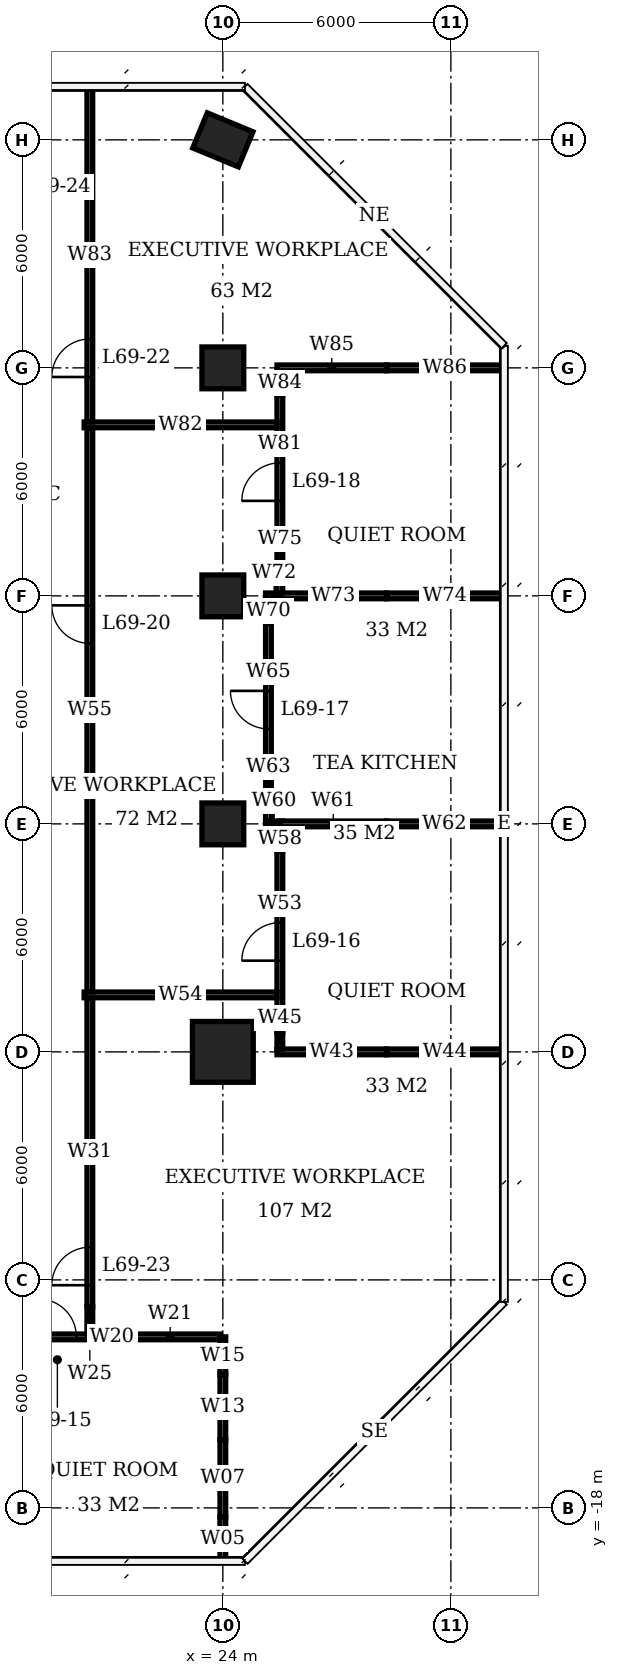
"""IFC4 building model, lengths in metres.
Left out: names, types, materials, properties, quantities, classifications, styles, units other than length and angle.
Written with IfcOpenShell. Run it as: python <this file> out.ifc"""

import sys

from ifc_helpers import new_model, si_unit, direction, frame, frame_2d, origin, origin_2d, place, context, subcontext, project, spatial, rectangle, extrude, element, fill, save


model = new_model("IFC4")
c1 = context("Model", 3, precision=1e-05, world=origin(), true_north=direction((0.0, 1.0)))
c2 = subcontext(c1, "Body", "Model", "MODEL_VIEW")
j1 = project(units=[si_unit("LENGTHUNIT", "METRE"), si_unit("PLANEANGLEUNIT", "RADIAN")], contexts=[c1])
p1 = place(None, origin())
s1 = spatial("IfcSite", under=j1, at=p1, CompositionType="ELEMENT")
p2 = place(p1, origin())
s2 = spatial("IfcBuilding", under=s1, at=p2, CompositionType="ELEMENT")
p3 = place(p2, frame((0.0, 0.0, 280.1)))
s3 = spatial("IfcBuildingStorey", under=s2, at=p3, CompositionType="ELEMENT", Elevation=280.1)
p4 = place(p3, frame((24.0, -6.0, 0.0), z_axis=(0.0, 0.0, 1.0), x_axis=(1.0, 0.0, 0.0)))
e1 = element("IfcColumn", 1, at=p4, inside=s3, PredefinedType="COLUMN", context=c2, shape_type="SweptSolid", body=[
    extrude(rectangle(XDim=1.6, YDim=1.6, at=origin_2d()), origin(), (0.0, 0.0, 1.0), 3.9),
])
for number, where, z_axis, x_axis in (
    (2, (24.0, 0.0, 0.0), (0.0, 0.0, 1.0), (1.0, 0.0, 0.0)),
    (3, (24.0, 6.0, 0.0), (0.0, 0.0, 1.0), (1.0, 0.0, 0.0)),
    (4, (24.0, 12.0, 0.0), (0.0, 0.0, 1.0), (1.0, 0.0, 0.0)),
):
    element("IfcColumn", number, at=place(p3, frame(where, z_axis=z_axis, x_axis=x_axis)), inside=s3, PredefinedType="COLUMN", context=c2, shape_type="SweptSolid", body=[
        extrude(rectangle(XDim=1.1, YDim=1.1, at=origin_2d()), origin(), (0.0, 0.0, 1.0), 3.9),
    ])
p5 = place(p3, frame((24.0, 18.0, 0.0), z_axis=(0.0, 0.0, 1.0), x_axis=(0.923879532511, -0.382683432365, 0.0)))
e5 = element("IfcColumn", 5, at=p5, inside=s3, PredefinedType="COLUMN", context=c2, shape_type="SweptSolid", body=[
    extrude(rectangle(XDim=1.3, YDim=1.0, at=origin_2d()), origin(), (0.0, 0.0, 1.0), 3.9),
])
p6 = place(p3, frame((18.075, -13.5, 0.0), z_axis=(0.0, 0.0, 1.0), x_axis=(1.0, 0.0, 0.0)))
e6 = element("IfcWall", 6, at=p6, inside=s3, PredefinedType="PARTITIONING", context=c2, shape_type="SweptSolid", body=[
    extrude(rectangle(XDim=3.217, YDim=0.15, at=frame_2d((1.608, 0.0))), origin(), (0.0, 0.0, 1.0), 2.65),
])
p7 = place(p6, frame((1.071, 0.0, 0.0)))
e7 = element("IfcOpeningElement", 7, at=p7, cuts=e6, PredefinedType="OPENING", context=c2, shape_type="SweptSolid", body=[
    extrude(rectangle(XDim=1.0, YDim=2.4, at=frame_2d((0.5, 1.2))), frame((0.0, 0.085, 0.0), z_axis=(0.0, -1.0, 0.0), x_axis=(1.0, 0.0, 0.0)), (0.0, 0.0, 1.0), 0.17),
])
p8 = place(p3, frame((21.292, -13.5, 0.0), z_axis=(0.0, 0.0, 1.0), x_axis=(1.0, 0.0, 0.0)))
e8 = element("IfcWall", 8, at=p8, inside=s3, PredefinedType="PARTITIONING", context=c2, shape_type="SweptSolid", body=[
    extrude(rectangle(XDim=2.643, YDim=0.15, at=frame_2d((1.322, 0.0))), origin(), (0.0, 0.0, 1.0), 3.65),
])
p9 = place(p3, frame((25.425, -6.0, 0.0), z_axis=(0.0, 0.0, 1.0), x_axis=(1.0, 0.0, 0.0)))
e9 = element("IfcWall", 9, at=p9, inside=s3, PredefinedType="PARTITIONING", context=c2, shape_type="SweptSolid", body=[
    extrude(rectangle(XDim=2.885, YDim=0.15, at=frame_2d((1.442, 0.0))), origin(), (0.0, 0.0, 1.0), 2.65),
])
p10 = place(p3, frame((28.31, -6.0, 0.0), z_axis=(0.0, 0.0, 1.0), x_axis=(1.0, 0.0, 0.0)))
e10 = element("IfcWall", 10, at=p10, inside=s3, PredefinedType="PARTITIONING", context=c2, shape_type="SweptSolid", body=[
    extrude(rectangle(XDim=3.065, YDim=0.15, at=frame_2d((1.532, 0.0))), origin(), (0.0, 0.0, 1.0), 3.65),
])
p11 = place(p3, frame((25.125, 0.0, 0.0), z_axis=(0.0, 0.0, 1.0), x_axis=(1.0, 0.0, 0.0)))
e11 = element("IfcWall", 11, at=p11, inside=s3, PredefinedType="PARTITIONING", context=c2, shape_type="SweptSolid", body=[
    extrude(rectangle(XDim=0.45, YDim=0.15, at=frame_2d((0.225, 0.0))), origin(), (0.0, 0.0, 1.0), 2.65),
])
p12 = place(p3, frame((25.5, 0.0, 0.0), z_axis=(0.0, 0.0, 1.0), x_axis=(1.0, 0.0, 0.0)))
e12 = element("IfcWall", 12, at=p12, inside=s3, PredefinedType="PARTITIONING", context=c2, shape_type="SweptSolid", body=[
    extrude(rectangle(XDim=2.81, YDim=0.15, at=frame_2d((1.405, 0.0))), origin(), (0.0, 0.0, 1.0), 2.65),
])
p13 = place(p3, frame((28.31, 0.0, 0.0), z_axis=(0.0, 0.0, 1.0), x_axis=(1.0, 0.0, 0.0)))
e13 = element("IfcWall", 13, at=p13, inside=s3, PredefinedType="PARTITIONING", context=c2, shape_type="SweptSolid", body=[
    extrude(rectangle(XDim=3.04, YDim=0.15, at=frame_2d((1.52, 0.0))), origin(), (0.0, 0.0, 1.0), 3.65),
])
p14 = place(p3, frame((25.125, 6.0, 0.0), z_axis=(0.0, 0.0, 1.0), x_axis=(1.0, 0.0, 0.0)))
e14 = element("IfcWall", 14, at=p14, inside=s3, PredefinedType="PARTITIONING", context=c2, shape_type="SweptSolid", body=[
    extrude(rectangle(XDim=0.45, YDim=0.15, at=frame_2d((0.225, 0.0))), origin(), (0.0, 0.0, 1.0), 2.65),
])
p15 = place(p3, frame((25.5, 6.0, 0.0), z_axis=(0.0, 0.0, 1.0), x_axis=(1.0, 0.0, 0.0)))
e15 = element("IfcWall", 15, at=p15, inside=s3, PredefinedType="PARTITIONING", context=c2, shape_type="SweptSolid", body=[
    extrude(rectangle(XDim=2.81, YDim=0.15, at=frame_2d((1.405, 0.0))), origin(), (0.0, 0.0, 1.0), 2.65),
])
p16 = place(p3, frame((28.31, 6.0, 0.0), z_axis=(0.0, 0.0, 1.0), x_axis=(1.0, 0.0, 0.0)))
e16 = element("IfcWall", 16, at=p16, inside=s3, PredefinedType="PARTITIONING", context=c2, shape_type="SweptSolid", body=[
    extrude(rectangle(XDim=3.065, YDim=0.15, at=frame_2d((1.532, 0.0))), origin(), (0.0, 0.0, 1.0), 3.65),
])
p17 = place(p3, frame((25.425, 12.0, 0.0), z_axis=(0.0, 0.0, 1.0), x_axis=(1.0, 0.0, 0.0)))
e17 = element("IfcWall", 17, at=p17, inside=s3, PredefinedType="PARTITIONING", context=c2, shape_type="SweptSolid", body=[
    extrude(rectangle(XDim=2.885, YDim=0.15, at=frame_2d((1.442, 0.0))), origin(), (0.0, 0.0, 1.0), 2.65),
])
p18 = place(p3, frame((28.31, 12.0, 0.0), z_axis=(0.0, 0.0, 1.0), x_axis=(1.0, 0.0, 0.0)))
e18 = element("IfcWall", 18, at=p18, inside=s3, PredefinedType="PARTITIONING", context=c2, shape_type="SweptSolid", body=[
    extrude(rectangle(XDim=3.065, YDim=0.15, at=frame_2d((1.532, 0.0))), origin(), (0.0, 0.0, 1.0), 3.65),
])
p19 = place(p3, frame((24.0, -19.375, 0.0), z_axis=(0.0, 0.0, 1.0), x_axis=(0.0, 1.0, 0.0)))
e19 = element("IfcWall", 19, at=p19, inside=s3, PredefinedType="PARTITIONING", context=c2, shape_type="SweptSolid", body=[
    extrude(rectangle(XDim=1.138, YDim=0.15, at=frame_2d((0.569, 0.0))), origin(), (0.0, 0.0, 1.0), 3.65),
])
p20 = place(p3, frame((24.0, -18.237, 0.0), z_axis=(0.0, 0.0, 1.0), x_axis=(0.0, 1.0, 0.0)))
e20 = element("IfcWall", 20, at=p20, inside=s3, PredefinedType="PARTITIONING", context=c2, shape_type="SweptSolid", body=[
    extrude(rectangle(XDim=2.029, YDim=0.15, at=frame_2d((1.015, 0.0))), origin(), (0.0, 0.0, 1.0), 2.65),
])
p21 = place(p3, frame((24.0, -16.208, 0.0), z_axis=(0.0, 0.0, 1.0), x_axis=(0.0, 1.0, 0.0)))
e21 = element("IfcWall", 21, at=p21, inside=s3, PredefinedType="PARTITIONING", context=c2, shape_type="SweptSolid", body=[
    extrude(rectangle(XDim=1.718, YDim=0.15, at=frame_2d((0.859, 0.0))), origin(), (0.0, 0.0, 1.0), 3.65),
])
p22 = place(p3, frame((24.0, -14.49, 0.0), z_axis=(0.0, 0.0, 1.0), x_axis=(0.0, 1.0, 0.0)))
e22 = element("IfcWall", 22, at=p22, inside=s3, PredefinedType="PARTITIONING", context=c2, shape_type="SweptSolid", body=[
    extrude(rectangle(XDim=0.99, YDim=0.15, at=frame_2d((0.495, 0.0))), origin(), (0.0, 0.0, 1.0), 2.65),
])
p23 = place(p3, frame((25.2, 0.075, 0.0), z_axis=(0.0, 0.0, 1.0), x_axis=(0.0, 1.0, 0.0)))
e23 = element("IfcWall", 23, at=p23, inside=s3, PredefinedType="PARTITIONING", context=c2, shape_type="SweptSolid", body=[
    extrude(rectangle(XDim=0.635, YDim=0.15, at=frame_2d((0.317, 0.0))), origin(), (0.0, 0.0, 1.0), 2.65),
])
p24 = place(p3, frame((25.2, 0.71, 0.0), z_axis=(0.0, 0.0, 1.0), x_axis=(0.0, 1.0, 0.0)))
e24 = element("IfcWall", 24, at=p24, inside=s3, PredefinedType="PARTITIONING", context=c2, shape_type="SweptSolid", body=[
    extrude(rectangle(XDim=4.58, YDim=0.15, at=frame_2d((2.29, 0.0))), origin(), (0.0, 0.0, 1.0), 3.65),
])
p25 = place(p24, frame((1.79, 0.0, 0.0)))
e25 = element("IfcOpeningElement", 25, at=p25, cuts=e24, PredefinedType="OPENING", context=c2, shape_type="SweptSolid", body=[
    extrude(rectangle(XDim=1.0, YDim=2.4, at=frame_2d((0.5, 1.2))), frame((0.0, 0.085, 0.0), z_axis=(0.0, -1.0, 0.0), x_axis=(1.0, 0.0, 0.0)), (0.0, 0.0, 1.0), 0.17),
])
p26 = place(p3, frame((25.2, 5.29, 0.0), z_axis=(0.0, 0.0, 1.0), x_axis=(0.0, 1.0, 0.0)))
e26 = element("IfcWall", 26, at=p26, inside=s3, PredefinedType="PARTITIONING", context=c2, shape_type="SweptSolid", body=[
    extrude(rectangle(XDim=0.635, YDim=0.15, at=frame_2d((0.317, 0.0))), origin(), (0.0, 0.0, 1.0), 2.65),
])
p27 = place(p3, frame((25.5, -5.925, 0.0), z_axis=(0.0, 0.0, 1.0), x_axis=(0.0, 1.0, 0.0)))
e27 = element("IfcWall", 27, at=p27, inside=s3, PredefinedType="PARTITIONING", context=c2, shape_type="SweptSolid", body=[
    extrude(rectangle(XDim=0.435, YDim=0.15, at=frame_2d((0.218, 0.0))), origin(), (0.0, 0.0, 1.0), 2.65),
])
p28 = place(p3, frame((25.5, -5.49, 0.0), z_axis=(0.0, 0.0, 1.0), x_axis=(0.0, 1.0, 0.0)))
e28 = element("IfcWall", 28, at=p28, inside=s3, PredefinedType="PARTITIONING", context=c2, shape_type="SweptSolid", body=[
    extrude(rectangle(XDim=4.78, YDim=0.15, at=frame_2d((2.39, 0.0))), origin(), (0.0, 0.0, 1.0), 3.65),
])
p29 = place(p28, frame((1.89, 0.0, 0.0)))
e29 = element("IfcOpeningElement", 29, at=p29, cuts=e28, PredefinedType="OPENING", context=c2, shape_type="SweptSolid", body=[
    extrude(rectangle(XDim=1.0, YDim=2.4, at=frame_2d((0.5, 1.2))), frame((0.0, 0.085, 0.0), z_axis=(0.0, -1.0, 0.0), x_axis=(1.0, 0.0, 0.0)), (0.0, 0.0, 1.0), 0.17),
])
for number, where, z_axis, x_axis in (
    (30, (25.5, -0.71, 0.0), (0.0, 0.0, 1.0), (0.0, 1.0, 0.0)),
    (31, (25.5, 6.075, 0.0), (0.0, 0.0, 1.0), (0.0, 1.0, 0.0)),
):
    element("IfcWall", number, at=place(p3, frame(where, z_axis=z_axis, x_axis=x_axis)), inside=s3, PredefinedType="PARTITIONING", context=c2, shape_type="SweptSolid", body=[
        extrude(rectangle(XDim=0.635, YDim=0.15, at=frame_2d((0.317, 0.0))), origin(), (0.0, 0.0, 1.0), 2.65),
    ])
p30 = place(p3, frame((25.5, 6.71, 0.0), z_axis=(0.0, 0.0, 1.0), x_axis=(0.0, 1.0, 0.0)))
e32 = element("IfcWall", 32, at=p30, inside=s3, PredefinedType="PARTITIONING", context=c2, shape_type="SweptSolid", body=[
    extrude(rectangle(XDim=4.58, YDim=0.15, at=frame_2d((2.29, 0.0))), origin(), (0.0, 0.0, 1.0), 3.65),
])
p31 = place(p30, frame((1.79, 0.0, 0.0)))
e33 = element("IfcOpeningElement", 33, at=p31, cuts=e32, PredefinedType="OPENING", context=c2, shape_type="SweptSolid", body=[
    extrude(rectangle(XDim=1.0, YDim=2.4, at=frame_2d((0.5, 1.2))), frame((0.0, 0.085, 0.0), z_axis=(0.0, -1.0, 0.0), x_axis=(1.0, 0.0, 0.0)), (0.0, 0.0, 1.0), 0.17),
])
p32 = place(p3, frame((25.5, 11.29, 0.0), z_axis=(0.0, 0.0, 1.0), x_axis=(0.0, 1.0, 0.0)))
e34 = element("IfcWall", 34, at=p32, inside=s3, PredefinedType="PARTITIONING", context=c2, shape_type="SweptSolid", body=[
    extrude(rectangle(XDim=0.635, YDim=0.15, at=frame_2d((0.317, 0.0))), origin(), (0.0, 0.0, 1.0), 2.65),
])
p33 = place(p3, frame((20.5, -13.425, 0.0), z_axis=(0.0, 0.0, 1.0), x_axis=(0.0, 1.0, 0.0)))
e35 = element("IfcWall", 35, at=p33, inside=s3, PredefinedType="PARTITIONING", context=c2, shape_type="SweptSolid", body=[
    extrude(rectangle(XDim=0.717, YDim=0.15, at=frame_2d((0.358, 0.0))), origin(), (0.0, 0.0, 1.0), 2.65),
])
p34 = place(p3, frame((20.5, -12.708, 0.0), z_axis=(0.0, 0.0, 1.0), x_axis=(0.0, 1.0, 0.0)))
e36 = element("IfcWall", 36, at=p34, inside=s3, PredefinedType="PARTITIONING", context=c2, shape_type="SweptSolid", body=[
    extrude(rectangle(XDim=8.133, YDim=0.15, at=frame_2d((4.066, 0.0))), origin(), (0.0, 0.0, 1.0), 3.65),
])
p35 = place(p34, frame((0.568, 0.0, 0.0)))
e37 = element("IfcOpeningElement", 37, at=p35, cuts=e36, PredefinedType="OPENING", context=c2, shape_type="SweptSolid", body=[
    extrude(rectangle(XDim=1.0, YDim=2.4, at=frame_2d((0.5, 1.2))), frame((0.0, 0.085, 0.0), z_axis=(0.0, -1.0, 0.0), x_axis=(1.0, 0.0, 0.0)), (0.0, 0.0, 1.0), 0.17),
])
p36 = place(p3, frame((20.5, -4.425, 0.0), z_axis=(0.0, 0.0, 1.0), x_axis=(0.0, 1.0, 0.0)))
e38 = element("IfcWall", 38, at=p36, inside=s3, PredefinedType="PARTITIONING", context=c2, shape_type="SweptSolid", body=[
    extrude(rectangle(XDim=14.85, YDim=0.15, at=frame_2d((7.425, 0.0))), origin(), (0.0, 0.0, 1.0), 3.65),
])
p37 = place(p36, frame((9.175, 0.0, 0.0)))
e39 = element("IfcOpeningElement", 39, at=p37, cuts=e38, PredefinedType="OPENING", context=c2, shape_type="SweptSolid", body=[
    extrude(rectangle(XDim=1.0, YDim=2.4, at=frame_2d((0.5, 1.2))), frame((0.0, 0.085, 0.0), z_axis=(0.0, -1.0, 0.0), x_axis=(1.0, 0.0, 0.0)), (0.0, 0.0, 1.0), 0.17),
])
p38 = place(p3, frame((20.35, -4.5, 0.0), z_axis=(0.0, 0.0, 1.0), x_axis=(1.0, 0.0, 0.0)))
e40 = element("IfcWall", 40, at=p38, inside=s3, PredefinedType="PARTITIONING", context=c2, shape_type="SweptSolid", body=[
    extrude(rectangle(XDim=5.075, YDim=0.15, at=frame_2d((2.538, 0.0))), origin(), (0.0, 0.0, 1.0), 3.65),
])
p39 = place(p3, frame((20.5, 10.575, 0.0), z_axis=(0.0, 0.0, 1.0), x_axis=(0.0, 1.0, 0.0)))
e41 = element("IfcWall", 41, at=p39, inside=s3, PredefinedType="PARTITIONING", context=c2, shape_type="SweptSolid", body=[
    extrude(rectangle(XDim=8.8, YDim=0.15, at=frame_2d((4.4, 0.0))), origin(), (0.0, 0.0, 1.0), 3.65),
])
p40 = place(p39, frame((1.185, 0.0, 0.0)))
e42 = element("IfcOpeningElement", 42, at=p40, cuts=e41, PredefinedType="OPENING", context=c2, shape_type="SweptSolid", body=[
    extrude(rectangle(XDim=1.0, YDim=2.4, at=frame_2d((0.5, 1.2))), frame((0.0, 0.085, 0.0), z_axis=(0.0, -1.0, 0.0), x_axis=(1.0, 0.0, 0.0)), (0.0, 0.0, 1.0), 0.17),
])
p41 = place(p3, frame((20.35, 10.5, 0.0), z_axis=(0.0, 0.0, 1.0), x_axis=(1.0, 0.0, 0.0)))
e43 = element("IfcWall", 43, at=p41, inside=s3, PredefinedType="PARTITIONING", context=c2, shape_type="SweptSolid", body=[
    extrude(rectangle(XDim=5.075, YDim=0.15, at=frame_2d((2.538, 0.0))), origin(), (0.0, 0.0, 1.0), 3.65),
])
p42 = place(p7, origin())
e44 = element("IfcDoor", 44, at=p42, inside=s3, OperationType="SINGLE_SWING_LEFT", PredefinedType="DOOR", context=c2, shape_type="SweptSolid", body=[
    extrude(rectangle(XDim=1.0, YDim=2.4, at=frame_2d((0.5, 1.2))), frame((0.0, 0.025, 0.0), z_axis=(0.0, -1.0, 0.0), x_axis=(1.0, 0.0, 0.0)), (0.0, 0.0, 1.0), 0.05),
])
fill(e7, e44)
p43 = place(p29, origin())
e45 = element("IfcDoor", 45, at=p43, inside=s3, OperationType="SINGLE_SWING_LEFT", PredefinedType="DOOR", context=c2, shape_type="SweptSolid", body=[
    extrude(rectangle(XDim=1.0, YDim=2.4, at=frame_2d((0.5, 1.2))), frame((0.0, 0.025, 0.0), z_axis=(0.0, -1.0, 0.0), x_axis=(1.0, 0.0, 0.0)), (0.0, 0.0, 1.0), 0.05),
])
fill(e29, e45)
p44 = place(p25, origin())
e46 = element("IfcDoor", 46, at=p44, inside=s3, OperationType="SINGLE_SWING_RIGHT", PredefinedType="DOOR", context=c2, shape_type="SweptSolid", body=[
    extrude(rectangle(XDim=1.0, YDim=2.4, at=frame_2d((0.5, 1.2))), frame((0.0, 0.025, 0.0), z_axis=(0.0, -1.0, 0.0), x_axis=(1.0, 0.0, 0.0)), (0.0, 0.0, 1.0), 0.05),
])
fill(e25, e46)
p45 = place(p31, origin())
e47 = element("IfcDoor", 47, at=p45, inside=s3, OperationType="SINGLE_SWING_LEFT", PredefinedType="DOOR", context=c2, shape_type="SweptSolid", body=[
    extrude(rectangle(XDim=1.0, YDim=2.4, at=frame_2d((0.5, 1.2))), frame((0.0, 0.025, 0.0), z_axis=(0.0, -1.0, 0.0), x_axis=(1.0, 0.0, 0.0)), (0.0, 0.0, 1.0), 0.05),
])
fill(e33, e47)
p46 = place(p37, origin())
e48 = element("IfcDoor", 48, at=p46, inside=s3, OperationType="SINGLE_SWING_RIGHT", PredefinedType="DOOR", context=c2, shape_type="SweptSolid", body=[
    extrude(rectangle(XDim=1.0, YDim=2.4, at=frame_2d((0.5, 1.2))), frame((0.0, 0.025, 0.0), z_axis=(0.0, -1.0, 0.0), x_axis=(1.0, 0.0, 0.0)), (0.0, 0.0, 1.0), 0.05),
])
fill(e39, e48)
p47 = place(p40, origin())
e49 = element("IfcDoor", 49, at=p47, inside=s3, OperationType="SINGLE_SWING_LEFT", PredefinedType="DOOR", context=c2, shape_type="SweptSolid", body=[
    extrude(rectangle(XDim=1.0, YDim=2.4, at=frame_2d((0.5, 1.2))), frame((0.0, 0.025, 0.0), z_axis=(0.0, -1.0, 0.0), x_axis=(1.0, 0.0, 0.0)), (0.0, 0.0, 1.0), 0.05),
])
fill(e42, e49)
p48 = place(p35, origin())
e50 = element("IfcDoor", 50, at=p48, inside=s3, OperationType="SINGLE_SWING_LEFT", PredefinedType="DOOR", context=c2, shape_type="SweptSolid", body=[
    extrude(rectangle(XDim=1.0, YDim=2.4, at=frame_2d((0.5, 1.2))), frame((0.0, 0.025, 0.0), z_axis=(0.0, -1.0, 0.0), x_axis=(1.0, 0.0, 0.0)), (0.0, 0.0, 1.0), 0.05),
])
fill(e37, e50)
save(model, sys.argv[1])
